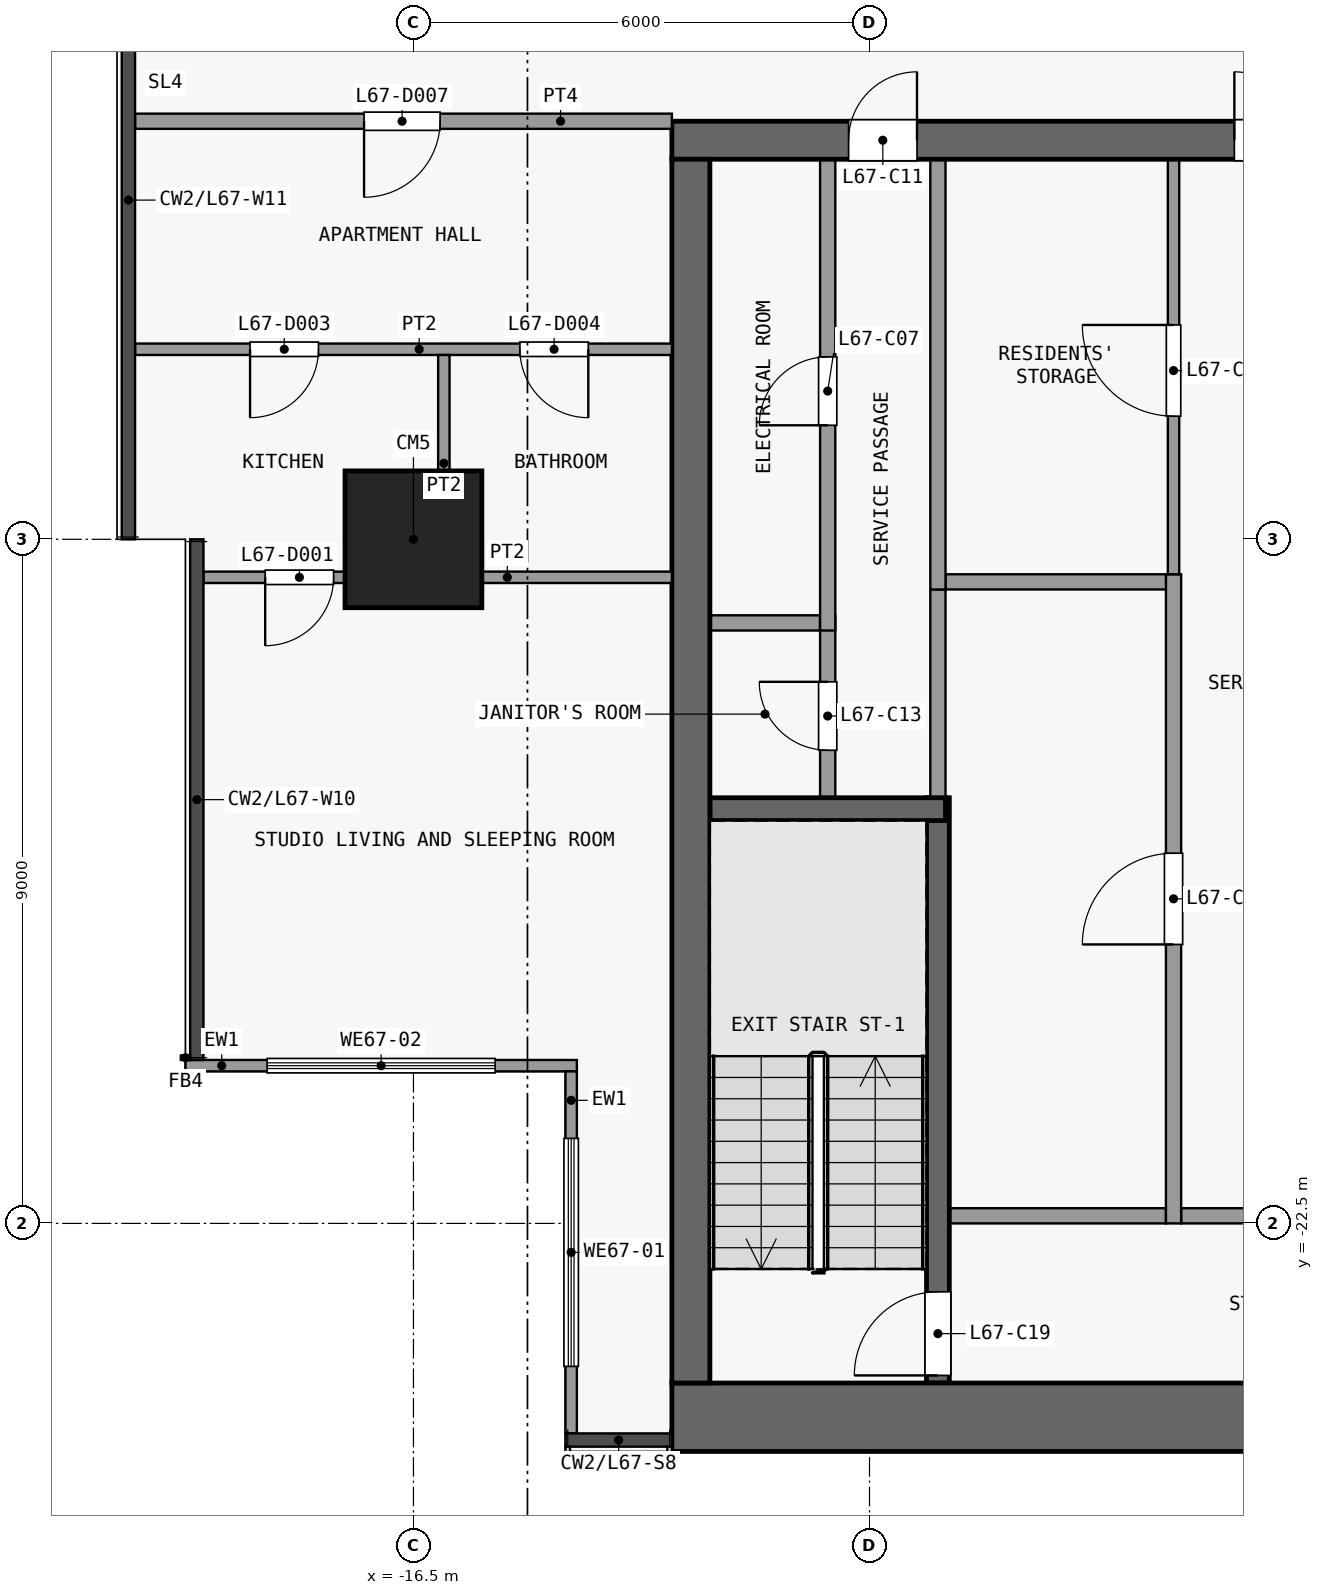
"""IFC4 building model, lengths in metres.
Left out: names, types, materials, properties, quantities, classifications, styles, units other than length and angle.
Written with IfcOpenShell. Run it as: python <this file> out.ifc"""

import sys

from ifc_helpers import new_model, si_unit, direction, frame, frame_2d, origin, origin_2d, place, context, subcontext, project, spatial, rectangle, extrude, element, fill, save


model = new_model("IFC4")
c1 = context("Model", 3, precision=1e-05, world=origin(), true_north=direction((0.0, 1.0)))
c2 = subcontext(c1, "Body", "Model", "MODEL_VIEW")
j1 = project(units=[si_unit("LENGTHUNIT", "METRE"), si_unit("PLANEANGLEUNIT", "RADIAN")], contexts=[c1])
p1 = place(None, origin())
s1 = spatial("IfcSite", under=j1, at=p1, CompositionType="ELEMENT")
p2 = place(p1, origin())
s2 = spatial("IfcBuilding", under=s1, at=p2, CompositionType="ELEMENT")
p3 = place(p2, frame((0.0, 0.0, 266.3)))
s3 = spatial("IfcBuildingStorey", under=s2, at=p3, CompositionType="ELEMENT", Elevation=266.3)
p4 = place(p3, frame((-16.5, -13.5, 0.0), z_axis=(0.0, 0.0, 1.0), x_axis=(1.0, 0.0, 0.0)))
e1 = element("IfcColumn", 1, at=p4, inside=s3, PredefinedType="COLUMN", context=c2, shape_type="SweptSolid", body=[
    extrude(rectangle(XDim=1.8, YDim=1.8, at=origin_2d()), origin(), (0.0, 0.0, 1.0), 3.6),
])
p5 = place(p3, frame((-13.1, -25.05, 0.0), z_axis=(0.0, 0.0, 1.0), x_axis=(1.0, 0.0, 0.0)))
e2 = element("IfcWall", 2, at=p5, inside=s3, PredefinedType="SHEAR", context=c2, shape_type="SweptSolid", body=[
    extrude(rectangle(XDim=26.2, YDim=0.9, at=frame_2d((13.1, 0.0))), origin(), (0.0, 0.0, 1.0), 3.3),
])
p6 = place(p3, frame((-13.1, -8.25, 0.0), z_axis=(0.0, 0.0, 1.0), x_axis=(1.0, 0.0, 0.0)))
e3 = element("IfcWall", 3, at=p6, inside=s3, PredefinedType="SHEAR", context=c2, shape_type="SweptSolid", body=[
    extrude(rectangle(XDim=26.2, YDim=0.5, at=frame_2d((13.1, 0.0))), origin(), (0.0, 0.0, 1.0), 3.3),
])
p7 = place(p6, frame((7.4, 0.0, 0.0)))
e4 = element("IfcOpeningElement", 4, at=p7, cuts=e3, PredefinedType="OPENING", context=c2, shape_type="SweptSolid", body=[
    extrude(rectangle(XDim=1.8, YDim=2.1, at=frame_2d((0.9, 1.05))), frame((0.0, 0.26, 0.0), z_axis=(0.0, -1.0, 0.0), x_axis=(1.0, 0.0, 0.0)), (0.0, 0.0, 1.0), 0.52),
])
p8 = place(p6, frame((17.0, 0.0, 0.0)))
e5 = element("IfcOpeningElement", 5, at=p8, cuts=e3, PredefinedType="OPENING", context=c2, shape_type="SweptSolid", body=[
    extrude(rectangle(XDim=1.8, YDim=2.1, at=frame_2d((0.9, 1.05))), frame((0.0, 0.26, 0.0), z_axis=(0.0, -1.0, 0.0), x_axis=(1.0, 0.0, 0.0)), (0.0, 0.0, 1.0), 0.52),
])
p9 = place(p6, frame((2.325, 0.0, 0.0)))
e6 = element("IfcOpeningElement", 6, at=p9, cuts=e3, PredefinedType="OPENING", context=c2, shape_type="SweptSolid", body=[
    extrude(rectangle(XDim=0.9, YDim=2.1, at=frame_2d((0.45, 1.05))), frame((0.0, 0.26, 0.0), z_axis=(0.0, -1.0, 0.0), x_axis=(1.0, 0.0, 0.0)), (0.0, 0.0, 1.0), 0.52),
])
p10 = place(p6, frame((22.975, 0.0, 0.0)))
e7 = element("IfcOpeningElement", 7, at=p10, cuts=e3, PredefinedType="OPENING", context=c2, shape_type="SweptSolid", body=[
    extrude(rectangle(XDim=0.9, YDim=2.1, at=frame_2d((0.45, 1.05))), frame((0.0, 0.26, 0.0), z_axis=(0.0, -1.0, 0.0), x_axis=(1.0, 0.0, 0.0)), (0.0, 0.0, 1.0), 0.52),
])
p11 = place(p3, frame((-12.85, -24.6, 0.0), z_axis=(0.0, 0.0, 1.0), x_axis=(0.0, 1.0, 0.0)))
e8 = element("IfcWall", 8, at=p11, inside=s3, PredefinedType="SHEAR", context=c2, shape_type="SweptSolid", body=[
    extrude(rectangle(XDim=16.1, YDim=0.5, at=frame_2d((8.05, 0.0))), origin(), (0.0, 0.0, 1.0), 3.3),
])
p12 = place(p3, frame((-9.45, -22.4, 0.0), z_axis=(0.0, 0.0, 1.0), x_axis=(1.0, 0.0, 0.0)))
e9 = element("IfcWall", 9, at=p12, inside=s3, PredefinedType="PARTITIONING", context=c2, shape_type="SweptSolid", body=[
    extrude(rectangle(XDim=2.85, YDim=0.2, at=frame_2d((1.425, 0.0))), origin(), (0.0, 0.0, 1.0), 3.3),
])
p13 = place(p3, frame((-3.25, -22.4, 0.0), z_axis=(0.0, 0.0, 1.0), x_axis=(-1.0, 0.0, 0.0)))
e10 = element("IfcWall", 10, at=p13, inside=s3, PredefinedType="PARTITIONING", context=c2, shape_type="SweptSolid", body=[
    extrude(rectangle(XDim=3.15, YDim=0.2, at=frame_2d((1.575, 0.0))), origin(), (0.0, 0.0, 1.0), 3.3),
])
p14 = place(p13, frame((0.8, 0.0, 0.0)))
e11 = element("IfcOpeningElement", 11, at=p14, cuts=e10, PredefinedType="OPENING", context=c2, shape_type="SweptSolid", body=[
    extrude(rectangle(XDim=1.5, YDim=2.1, at=frame_2d((0.75, 1.05))), frame((0.0, 0.11, 0.0), z_axis=(0.0, -1.0, 0.0), x_axis=(1.0, 0.0, 0.0)), (0.0, 0.0, 1.0), 0.22),
])
p15 = place(p3, frame((-12.6, -17.05, 0.0), z_axis=(0.0, 0.0, 1.0), x_axis=(1.0, 0.0, 0.0)))
e12 = element("IfcWall", 12, at=p15, inside=s3, PredefinedType="SHEAR", context=c2, shape_type="SweptSolid", body=[
    extrude(rectangle(XDim=3.1, YDim=0.3, at=frame_2d((1.55, 0.0))), origin(), (0.0, 0.0, 1.0), 3.3),
])
p16 = place(p3, frame((-12.6, -14.6, 0.0), z_axis=(0.0, 0.0, 1.0), x_axis=(1.0, 0.0, 0.0)))
e13 = element("IfcWall", 13, at=p16, inside=s3, PredefinedType="PARTITIONING", context=c2, shape_type="SweptSolid", body=[
    extrude(rectangle(XDim=1.45, YDim=0.2, at=frame_2d((0.725, 0.0))), origin(), (0.0, 0.0, 1.0), 3.3),
])
p17 = place(p3, frame((-9.5, -14.06, 0.0), z_axis=(0.0, 0.0, 1.0), x_axis=(1.0, 0.0, 0.0)))
e14 = element("IfcWall", 14, at=p17, inside=s3, PredefinedType="PARTITIONING", context=c2, shape_type="SweptSolid", body=[
    extrude(rectangle(XDim=3.075, YDim=0.2, at=frame_2d((1.538, 0.0))), origin(), (0.0, 0.0, 1.0), 3.3),
])
p18 = place(p3, frame((-11.05, -16.9, 0.0), z_axis=(0.0, 0.0, 1.0), x_axis=(0.0, 1.0, 0.0)))
e15 = element("IfcWall", 15, at=p18, inside=s3, PredefinedType="PARTITIONING", context=c2, shape_type="SweptSolid", body=[
    extrude(rectangle(XDim=2.4, YDim=0.2, at=frame_2d((1.2, 0.0))), origin(), (0.0, 0.0, 1.0), 3.3),
])
p19 = place(p18, frame((0.625, 0.0, 0.0)))
e16 = element("IfcOpeningElement", 16, at=p19, cuts=e15, PredefinedType="OPENING", context=c2, shape_type="SweptSolid", body=[
    extrude(rectangle(XDim=0.9, YDim=2.1, at=frame_2d((0.45, 1.05))), frame((0.0, 0.11, 0.0), z_axis=(0.0, -1.0, 0.0), x_axis=(1.0, 0.0, 0.0)), (0.0, 0.0, 1.0), 0.22),
])
p20 = place(p3, frame((-11.05, -14.7, 0.0), z_axis=(0.0, 0.0, 1.0), x_axis=(0.0, 1.0, 0.0)))
e17 = element("IfcWall", 17, at=p20, inside=s3, PredefinedType="PARTITIONING", context=c2, shape_type="SweptSolid", body=[
    extrude(rectangle(XDim=6.2, YDim=0.2, at=frame_2d((3.1, 0.0))), origin(), (0.0, 0.0, 1.0), 3.3),
])
p21 = place(p20, frame((2.7, 0.0, 0.0)))
e18 = element("IfcOpeningElement", 18, at=p21, cuts=e17, PredefinedType="OPENING", context=c2, shape_type="SweptSolid", body=[
    extrude(rectangle(XDim=0.9, YDim=2.1, at=frame_2d((0.45, 1.05))), frame((0.0, 0.11, 0.0), z_axis=(0.0, -1.0, 0.0), x_axis=(1.0, 0.0, 0.0)), (0.0, 0.0, 1.0), 0.22),
])
p22 = place(p3, frame((-9.6, -24.6, 0.0), z_axis=(0.0, 0.0, 1.0), x_axis=(0.0, 1.0, 0.0)))
e19 = element("IfcWall", 19, at=p22, inside=s3, PredefinedType="SHEAR", context=c2, shape_type="SweptSolid", body=[
    extrude(rectangle(XDim=7.7, YDim=0.3, at=frame_2d((3.85, 0.0))), origin(), (0.0, 0.0, 1.0), 3.3),
])
p23 = place(p22, frame((0.1, 0.0, 0.0)))
e20 = element("IfcOpeningElement", 20, at=p23, cuts=e19, PredefinedType="OPENING", context=c2, shape_type="SweptSolid", body=[
    extrude(rectangle(XDim=1.1, YDim=2.1, at=frame_2d((0.55, 1.05))), frame((0.0, 0.16, 0.0), z_axis=(0.0, -1.0, 0.0), x_axis=(1.0, 0.0, 0.0)), (0.0, 0.0, 1.0), 0.32),
])
p24 = place(p3, frame((-9.6, -16.9, 0.0), z_axis=(0.0, 0.0, 1.0), x_axis=(0.0, 1.0, 0.0)))
e21 = element("IfcWall", 21, at=p24, inside=s3, PredefinedType="PARTITIONING", context=c2, shape_type="SweptSolid", body=[
    extrude(rectangle(XDim=2.74, YDim=0.2, at=frame_2d((1.37, 0.0))), origin(), (0.0, 0.0, 1.0), 3.3),
])
p25 = place(p3, frame((-9.6, -14.16, 0.0), z_axis=(0.0, 0.0, 1.0), x_axis=(0.0, 1.0, 0.0)))
e22 = element("IfcWall", 22, at=p25, inside=s3, PredefinedType="PARTITIONING", context=c2, shape_type="SweptSolid", body=[
    extrude(rectangle(XDim=5.66, YDim=0.2, at=frame_2d((2.83, 0.0))), origin(), (0.0, 0.0, 1.0), 3.3),
])
p26 = place(p3, frame((-6.5, -22.5, 0.0), z_axis=(0.0, 0.0, 1.0), x_axis=(0.0, 1.0, 0.0)))
e23 = element("IfcWall", 23, at=p26, inside=s3, PredefinedType="PARTITIONING", context=c2, shape_type="SweptSolid", body=[
    extrude(rectangle(XDim=8.54, YDim=0.2, at=frame_2d((4.27, 0.0))), origin(), (0.0, 0.0, 1.0), 3.3),
])
p27 = place(p26, frame((3.67, 0.0, 0.0)))
e24 = element("IfcOpeningElement", 24, at=p27, cuts=e23, PredefinedType="OPENING", context=c2, shape_type="SweptSolid", body=[
    extrude(rectangle(XDim=1.2, YDim=2.1, at=frame_2d((0.6, 1.05))), frame((0.0, 0.11, 0.0), z_axis=(0.0, -1.0, 0.0), x_axis=(1.0, 0.0, 0.0)), (0.0, 0.0, 1.0), 0.22),
])
p28 = place(p3, frame((-6.5, -13.96, 0.0), z_axis=(0.0, 0.0, 1.0), x_axis=(0.0, 1.0, 0.0)))
e25 = element("IfcWall", 25, at=p28, inside=s3, PredefinedType="PARTITIONING", context=c2, shape_type="SweptSolid", body=[
    extrude(rectangle(XDim=5.46, YDim=0.15, at=frame_2d((2.73, 0.0))), origin(), (0.0, 0.0, 1.0), 3.3),
])
p29 = place(p28, frame((2.08, 0.0, 0.0)))
e26 = element("IfcOpeningElement", 26, at=p29, cuts=e25, PredefinedType="OPENING", context=c2, shape_type="SweptSolid", body=[
    extrude(rectangle(XDim=1.2, YDim=2.1, at=frame_2d((0.6, 1.05))), frame((0.0, 0.085, 0.0), z_axis=(0.0, -1.0, 0.0), x_axis=(1.0, 0.0, 0.0)), (0.0, 0.0, 1.0), 0.17),
])
p30 = place(p3, frame((-14.425, -25.262, 0.0), z_axis=(0.0, 0.0, 1.0), x_axis=(0.0, 1.0, 0.0)))
e27 = element("IfcWall", 27, at=p30, inside=s3, PredefinedType="SOLIDWALL", context=c2, shape_type="SweptSolid", body=[
    extrude(rectangle(XDim=4.762, YDim=0.15, at=frame_2d((2.381, 0.0))), origin(), (0.0, 0.0, 1.0), 3.3),
])
p31 = place(p30, frame((0.881, 0.0, 0.9)))
e28 = element("IfcOpeningElement", 28, at=p31, cuts=e27, PredefinedType="OPENING", context=c2, shape_type="SweptSolid", body=[
    extrude(rectangle(XDim=3.0, YDim=2.4, at=frame_2d((1.5, 1.2))), frame((0.0, 0.085, 0.0), z_axis=(0.0, -1.0, 0.0), x_axis=(1.0, 0.0, 0.0)), (0.0, 0.0, 1.0), 0.17),
])
p32 = place(p3, frame((-14.35, -20.425, 0.0), z_axis=(0.0, 0.0, 1.0), x_axis=(-1.0, 0.0, 0.0)))
e29 = element("IfcWall", 29, at=p32, inside=s3, PredefinedType="SOLIDWALL", context=c2, shape_type="SweptSolid", body=[
    extrude(rectangle(XDim=5.15, YDim=0.15, at=frame_2d((2.575, 0.0))), origin(), (0.0, 0.0, 1.0), 3.3),
])
p33 = place(p32, frame((1.075, 0.0, 0.9)))
e30 = element("IfcOpeningElement", 30, at=p33, cuts=e29, PredefinedType="OPENING", context=c2, shape_type="SweptSolid", body=[
    extrude(rectangle(XDim=3.0, YDim=2.4, at=frame_2d((1.5, 1.2))), frame((0.0, 0.085, 0.0), z_axis=(0.0, -1.0, 0.0), x_axis=(1.0, 0.0, 0.0)), (0.0, 0.0, 1.0), 0.17),
])
p34 = place(p3, frame((-19.262, -14.0, 0.0), z_axis=(0.0, 0.0, 1.0), x_axis=(1.0, 0.0, 0.0)))
e31 = element("IfcWall", 31, at=p34, inside=s3, PredefinedType="PARTITIONING", context=c2, shape_type="SweptSolid", body=[
    extrude(rectangle(XDim=6.162, YDim=0.15, at=frame_2d((3.081, 0.0))), origin(), (0.0, 0.0, 1.0), 3.3),
])
p35 = place(p34, frame((0.812, 0.0, 0.0)))
e32 = element("IfcOpeningElement", 32, at=p35, cuts=e31, PredefinedType="OPENING", context=c2, shape_type="SweptSolid", body=[
    extrude(rectangle(XDim=0.9, YDim=2.1, at=frame_2d((0.45, 1.05))), frame((0.0, 0.085, 0.0), z_axis=(0.0, -1.0, 0.0), x_axis=(1.0, 0.0, 0.0)), (0.0, 0.0, 1.0), 0.17),
])
p36 = place(p3, frame((-20.163, -11.0, 0.0), z_axis=(0.0, 0.0, 1.0), x_axis=(1.0, 0.0, 0.0)))
e33 = element("IfcWall", 33, at=p36, inside=s3, PredefinedType="PARTITIONING", context=c2, shape_type="SweptSolid", body=[
    extrude(rectangle(XDim=7.062, YDim=0.15, at=frame_2d((3.531, 0.0))), origin(), (0.0, 0.0, 1.0), 3.3),
])
p37 = place(p36, frame((1.513, 0.0, 0.0)))
e34 = element("IfcOpeningElement", 34, at=p37, cuts=e33, PredefinedType="OPENING", context=c2, shape_type="SweptSolid", body=[
    extrude(rectangle(XDim=0.9, YDim=2.1, at=frame_2d((0.45, 1.05))), frame((0.0, 0.085, 0.0), z_axis=(0.0, -1.0, 0.0), x_axis=(1.0, 0.0, 0.0)), (0.0, 0.0, 1.0), 0.17),
])
p38 = place(p36, frame((5.063, 0.0, 0.0)))
e35 = element("IfcOpeningElement", 35, at=p38, cuts=e33, PredefinedType="OPENING", context=c2, shape_type="SweptSolid", body=[
    extrude(rectangle(XDim=0.9, YDim=2.1, at=frame_2d((0.45, 1.05))), frame((0.0, 0.085, 0.0), z_axis=(0.0, -1.0, 0.0), x_axis=(1.0, 0.0, 0.0)), (0.0, 0.0, 1.0), 0.17),
])
p39 = place(p3, frame((-20.163, -8.0, 0.0), z_axis=(0.0, 0.0, 1.0), x_axis=(1.0, 0.0, 0.0)))
e36 = element("IfcWall", 36, at=p39, inside=s3, PredefinedType="PARTITIONING", context=c2, shape_type="SweptSolid", body=[
    extrude(rectangle(XDim=7.062, YDim=0.2, at=frame_2d((3.531, 0.0))), origin(), (0.0, 0.0, 1.0), 3.3),
])
p40 = place(p39, frame((3.013, 0.0, 0.0)))
e37 = element("IfcOpeningElement", 37, at=p40, cuts=e36, PredefinedType="OPENING", context=c2, shape_type="SweptSolid", body=[
    extrude(rectangle(XDim=1.0, YDim=2.1, at=frame_2d((0.5, 1.05))), frame((0.0, 0.11, 0.0), z_axis=(0.0, -1.0, 0.0), x_axis=(1.0, 0.0, 0.0)), (0.0, 0.0, 1.0), 0.22),
])
p41 = place(p3, frame((-16.1, -13.925, 0.0), z_axis=(0.0, 0.0, 1.0), x_axis=(0.0, 1.0, 0.0)))
e38 = element("IfcWall", 38, at=p41, inside=s3, PredefinedType="PARTITIONING", context=c2, shape_type="SweptSolid", body=[
    extrude(rectangle(XDim=2.85, YDim=0.15, at=frame_2d((1.425, 0.0))), origin(), (0.0, 0.0, 1.0), 3.3),
])
p42 = place(p7, origin())
e39 = element("IfcDoor", 39, at=p42, inside=s3, OperationType="DOUBLE_DOOR_SINGLE_SWING", PredefinedType="DOOR", context=c2, shape_type="SweptSolid", body=[
    extrude(rectangle(XDim=1.8, YDim=2.1, at=frame_2d((0.9, 1.05))), frame((0.0, 0.025, 0.0), z_axis=(0.0, -1.0, 0.0), x_axis=(1.0, 0.0, 0.0)), (0.0, 0.0, 1.0), 0.05),
])
fill(e4, e39)
p43 = place(p21, origin())
e40 = element("IfcDoor", 40, at=p43, inside=s3, OperationType="SINGLE_SWING_LEFT", PredefinedType="DOOR", context=c2, shape_type="SweptSolid", body=[
    extrude(rectangle(XDim=0.9, YDim=2.1, at=frame_2d((0.45, 1.05))), frame((0.0, 0.025, 0.0), z_axis=(0.0, -1.0, 0.0), x_axis=(1.0, 0.0, 0.0)), (0.0, 0.0, 1.0), 0.05),
])
fill(e18, e40)
p44 = place(p27, origin())
e41 = element("IfcDoor", 41, at=p44, inside=s3, OperationType="SINGLE_SWING_LEFT", PredefinedType="DOOR", context=c2, shape_type="SweptSolid", body=[
    extrude(rectangle(XDim=1.2, YDim=2.1, at=frame_2d((0.6, 1.05))), frame((0.0, 0.025, 0.0), z_axis=(0.0, -1.0, 0.0), x_axis=(1.0, 0.0, 0.0)), (0.0, 0.0, 1.0), 0.05),
])
fill(e24, e41)
p45 = place(p9, origin())
e42 = element("IfcDoor", 42, at=p45, inside=s3, OperationType="SINGLE_SWING_RIGHT", PredefinedType="DOOR", context=c2, shape_type="SweptSolid", body=[
    extrude(rectangle(XDim=0.9, YDim=2.1, at=frame_2d((0.45, 1.05))), frame((0.0, 0.025, 0.0), z_axis=(0.0, -1.0, 0.0), x_axis=(1.0, 0.0, 0.0)), (0.0, 0.0, 1.0), 0.05),
])
fill(e6, e42)
p46 = place(p19, origin())
e43 = element("IfcDoor", 43, at=p46, inside=s3, OperationType="SINGLE_SWING_RIGHT", PredefinedType="DOOR", context=c2, shape_type="SweptSolid", body=[
    extrude(rectangle(XDim=0.9, YDim=2.1, at=frame_2d((0.45, 1.05))), frame((0.0, 0.025, 0.0), z_axis=(0.0, -1.0, 0.0), x_axis=(1.0, 0.0, 0.0)), (0.0, 0.0, 1.0), 0.05),
])
fill(e16, e43)
p47 = place(p29, origin())
e44 = element("IfcDoor", 44, at=p47, inside=s3, OperationType="SINGLE_SWING_RIGHT", PredefinedType="DOOR", context=c2, shape_type="SweptSolid", body=[
    extrude(rectangle(XDim=1.2, YDim=2.1, at=frame_2d((0.6, 1.05))), frame((0.0, 0.025, 0.0), z_axis=(0.0, -1.0, 0.0), x_axis=(1.0, 0.0, 0.0)), (0.0, 0.0, 1.0), 0.05),
])
fill(e26, e44)
p48 = place(p23, origin())
e45 = element("IfcDoor", 45, at=p48, inside=s3, OperationType="SINGLE_SWING_LEFT", PredefinedType="DOOR", context=c2, shape_type="SweptSolid", body=[
    extrude(rectangle(XDim=1.1, YDim=2.1, at=frame_2d((0.55, 1.05))), frame((0.0, 0.025, 0.0), z_axis=(0.0, -1.0, 0.0), x_axis=(1.0, 0.0, 0.0)), (0.0, 0.0, 1.0), 0.05),
])
fill(e20, e45)
p49 = place(p31, origin())
e46 = element("IfcWindow", 46, at=p49, inside=s3, PartitioningType="SINGLE_PANEL", PredefinedType="WINDOW", context=c2, shape_type="SweptSolid", body=[
    extrude(rectangle(XDim=3.0, YDim=2.4, at=frame_2d((1.5, 1.2))), frame((0.0, 0.03, 0.0), z_axis=(0.0, -1.0, 0.0), x_axis=(1.0, 0.0, 0.0)), (0.0, 0.0, 1.0), 0.06),
])
fill(e28, e46)
p50 = place(p33, origin())
e47 = element("IfcWindow", 47, at=p50, inside=s3, PartitioningType="SINGLE_PANEL", PredefinedType="WINDOW", context=c2, shape_type="SweptSolid", body=[
    extrude(rectangle(XDim=3.0, YDim=2.4, at=frame_2d((1.5, 1.2))), frame((0.0, 0.03, 0.0), z_axis=(0.0, -1.0, 0.0), x_axis=(1.0, 0.0, 0.0)), (0.0, 0.0, 1.0), 0.06),
])
fill(e30, e47)
p51 = place(p35, origin())
e48 = element("IfcDoor", 48, at=p51, inside=s3, OperationType="SINGLE_SWING_LEFT", PredefinedType="DOOR", context=c2, shape_type="SweptSolid", body=[
    extrude(rectangle(XDim=0.9, YDim=2.1, at=frame_2d((0.45, 1.05))), frame((0.0, 0.025, 0.0), z_axis=(0.0, -1.0, 0.0), x_axis=(1.0, 0.0, 0.0)), (0.0, 0.0, 1.0), 0.05),
])
fill(e32, e48)
p52 = place(p37, origin())
e49 = element("IfcDoor", 49, at=p52, inside=s3, OperationType="SINGLE_SWING_LEFT", PredefinedType="DOOR", context=c2, shape_type="SweptSolid", body=[
    extrude(rectangle(XDim=0.9, YDim=2.1, at=frame_2d((0.45, 1.05))), frame((0.0, 0.025, 0.0), z_axis=(0.0, -1.0, 0.0), x_axis=(1.0, 0.0, 0.0)), (0.0, 0.0, 1.0), 0.05),
])
fill(e34, e49)
p53 = place(p38, origin())
e50 = element("IfcDoor", 50, at=p53, inside=s3, OperationType="SINGLE_SWING_RIGHT", PredefinedType="DOOR", context=c2, shape_type="SweptSolid", body=[
    extrude(rectangle(XDim=0.9, YDim=2.1, at=frame_2d((0.45, 1.05))), frame((0.0, 0.025, 0.0), z_axis=(0.0, -1.0, 0.0), x_axis=(1.0, 0.0, 0.0)), (0.0, 0.0, 1.0), 0.05),
])
fill(e35, e50)
p54 = place(p40, origin())
e51 = element("IfcDoor", 51, at=p54, inside=s3, OperationType="SINGLE_SWING_LEFT", PredefinedType="DOOR", context=c2, shape_type="SweptSolid", body=[
    extrude(rectangle(XDim=1.0, YDim=2.1, at=frame_2d((0.5, 1.05))), frame((0.0, 0.025, 0.0), z_axis=(0.0, -1.0, 0.0), x_axis=(1.0, 0.0, 0.0)), (0.0, 0.0, 1.0), 0.05),
])
fill(e37, e51)
save(model, sys.argv[1])
